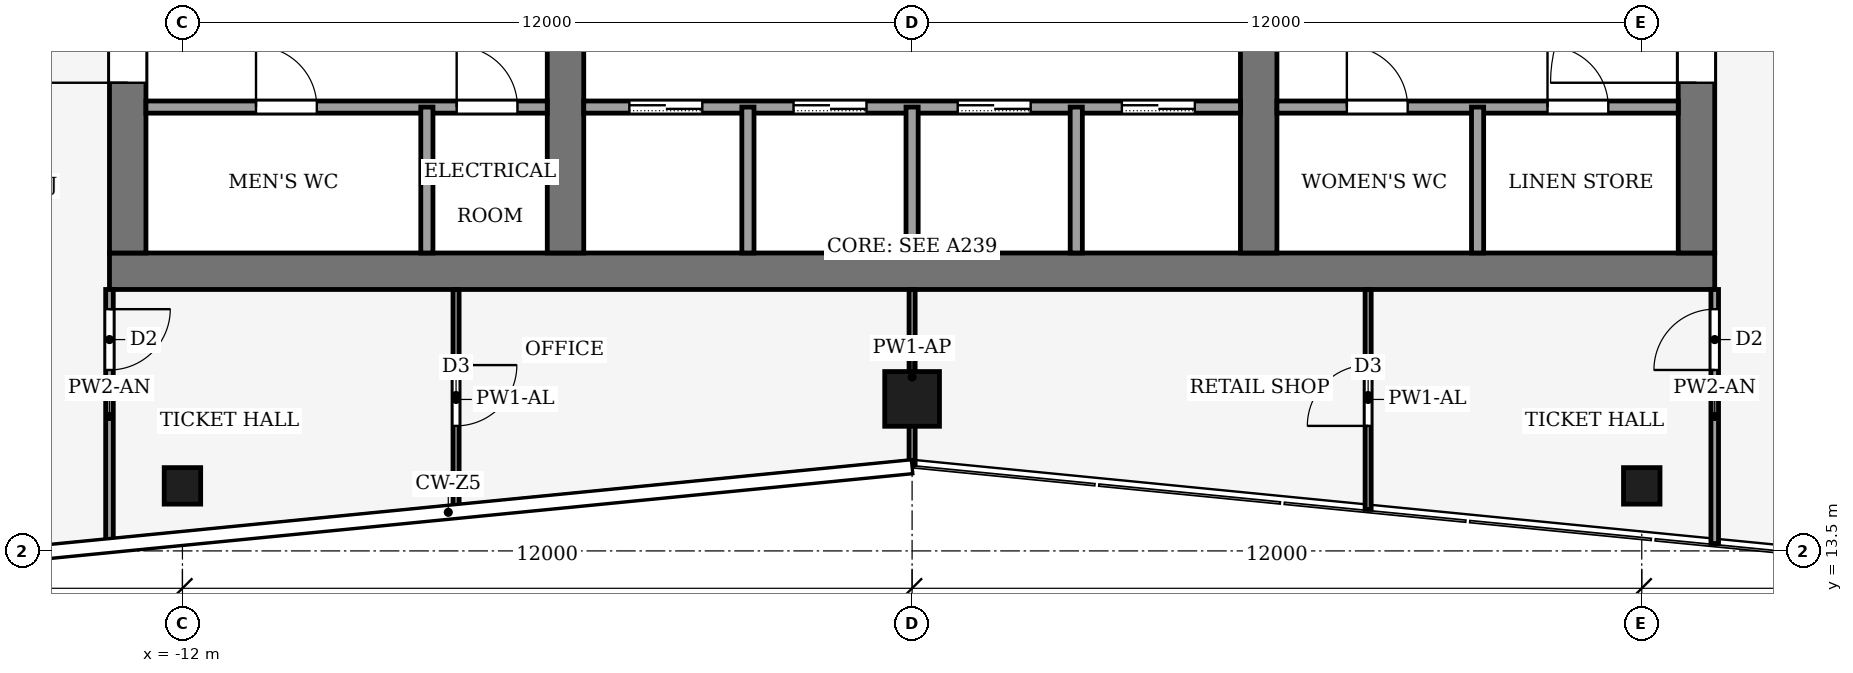
"""IFC4 building model, lengths in metres.
Left out: names, types, materials, properties, quantities, classifications, styles, units other than length and angle.
Written with IfcOpenShell. Run it as: python <this file> out.ifc"""

import sys

from ifc_helpers import new_model, si_unit, direction, frame, frame_2d, origin, origin_2d, place, context, subcontext, project, spatial, rectangle, hollow_rectangle, extrude, element, fill, save


model = new_model("IFC4")
c1 = context("Model", 3, precision=1e-05, world=origin(), true_north=direction((0.0, 1.0)))
c2 = subcontext(c1, "Body", "Model", "MODEL_VIEW")
j1 = project(units=[si_unit("LENGTHUNIT", "METRE"), si_unit("PLANEANGLEUNIT", "RADIAN")], contexts=[c1])
p1 = place(None, origin())
s1 = spatial("IfcSite", under=j1, at=p1, CompositionType="ELEMENT")
p2 = place(p1, origin())
s2 = spatial("IfcBuilding", under=s1, at=p2, CompositionType="ELEMENT")
p3 = place(p2, frame((0.0, 0.0, 334.0)))
s3 = spatial("IfcBuildingStorey", under=s2, at=p3, CompositionType="ELEMENT", Elevation=334.0)
p4 = place(p3, frame((-13.2, 18.1, -0.18), z_axis=(0.0, 0.0, 1.0), x_axis=(1.0, 0.0, 0.0)))
e1 = element("IfcWall", 1, at=p4, inside=s3, PredefinedType="SHEAR", context=c2, shape_type="SweptSolid", body=[
    extrude(rectangle(XDim=26.4, YDim=0.6, at=frame_2d((13.2, 0.0))), origin(), (0.0, 0.0, 1.0), 6.53),
])
p5 = place(p3, frame((-12.9, 18.4, -0.18), z_axis=(0.0, 0.0, 1.0), x_axis=(0.0, 1.0, 0.0)))
e2 = element("IfcWall", 2, at=p5, inside=s3, PredefinedType="SHEAR", context=c2, shape_type="SweptSolid", body=[
    extrude(rectangle(XDim=19.2, YDim=0.6, at=frame_2d((9.6, 0.0))), origin(), (0.0, 0.0, 1.0), 6.53),
])
p6 = place(p5, frame((2.8, 0.0, 0.18)))
e3 = element("IfcOpeningElement", 3, at=p6, cuts=e2, PredefinedType="OPENING", context=c2, shape_type="SweptSolid", body=[
    extrude(rectangle(XDim=2.4, YDim=2.4, at=frame_2d((1.2, 1.2))), frame((0.0, 0.31, 0.0), z_axis=(0.0, -1.0, 0.0), x_axis=(1.0, 0.0, 0.0)), (0.0, 0.0, 1.0), 0.62),
])
p7 = place(p5, frame((13.4, 0.0, 0.18)))
e4 = element("IfcOpeningElement", 4, at=p7, cuts=e2, PredefinedType="OPENING", context=c2, shape_type="SweptSolid", body=[
    extrude(rectangle(XDim=1.4, YDim=2.2, at=frame_2d((0.7, 1.1))), frame((0.0, 0.31, 0.0), z_axis=(0.0, -1.0, 0.0), x_axis=(1.0, 0.0, 0.0)), (0.0, 0.0, 1.0), 0.62),
])
p8 = place(p3, frame((12.9, 18.4, -0.18), z_axis=(0.0, 0.0, 1.0), x_axis=(0.0, 1.0, 0.0)))
e5 = element("IfcWall", 5, at=p8, inside=s3, PredefinedType="SHEAR", context=c2, shape_type="SweptSolid", body=[
    extrude(rectangle(XDim=19.2, YDim=0.6, at=frame_2d((9.6, 0.0))), origin(), (0.0, 0.0, 1.0), 6.53),
])
p9 = place(p8, frame((2.8, 0.0, 0.18)))
e6 = element("IfcOpeningElement", 6, at=p9, cuts=e5, PredefinedType="OPENING", context=c2, shape_type="SweptSolid", body=[
    extrude(rectangle(XDim=2.4, YDim=2.4, at=frame_2d((1.2, 1.2))), frame((0.0, 0.31, 0.0), z_axis=(0.0, -1.0, 0.0), x_axis=(1.0, 0.0, 0.0)), (0.0, 0.0, 1.0), 0.62),
])
p10 = place(p8, frame((13.3, 0.0, 0.18)))
e7 = element("IfcOpeningElement", 7, at=p10, cuts=e5, PredefinedType="OPENING", context=c2, shape_type="SweptSolid", body=[
    extrude(rectangle(XDim=2.4, YDim=2.4, at=frame_2d((1.2, 1.2))), frame((0.0, 0.31, 0.0), z_axis=(0.0, -1.0, 0.0), x_axis=(1.0, 0.0, 0.0)), (0.0, 0.0, 1.0), 0.62),
])
p11 = place(p3, frame((-5.7, 18.4, -0.18), z_axis=(0.0, 0.0, 1.0), x_axis=(0.0, 1.0, 0.0)))
e8 = element("IfcWall", 8, at=p11, inside=s3, PredefinedType="SHEAR", context=c2, shape_type="SweptSolid", body=[
    extrude(rectangle(XDim=19.2, YDim=0.6, at=frame_2d((9.6, 0.0))), origin(), (0.0, 0.0, 1.0), 6.53),
])
p12 = place(p11, frame((8.35, 0.0, 0.18)))
e9 = element("IfcOpeningElement", 9, at=p12, cuts=e8, PredefinedType="OPENING", context=c2, shape_type="SweptSolid", body=[
    extrude(rectangle(XDim=0.9, YDim=2.1, at=frame_2d((0.45, 1.05))), frame((0.0, 0.31, 0.0), z_axis=(0.0, -1.0, 0.0), x_axis=(1.0, 0.0, 0.0)), (0.0, 0.0, 1.0), 0.62),
])
p13 = place(p3, frame((5.7, 18.4, -0.18), z_axis=(0.0, 0.0, 1.0), x_axis=(0.0, 1.0, 0.0)))
e10 = element("IfcWall", 10, at=p13, inside=s3, PredefinedType="SHEAR", context=c2, shape_type="SweptSolid", body=[
    extrude(rectangle(XDim=19.2, YDim=0.6, at=frame_2d((9.6, 0.0))), origin(), (0.0, 0.0, 1.0), 6.53),
])
p14 = place(p13, frame((8.35, 0.0, 0.18)))
e11 = element("IfcOpeningElement", 11, at=p14, cuts=e10, PredefinedType="OPENING", context=c2, shape_type="SweptSolid", body=[
    extrude(rectangle(XDim=0.9, YDim=2.1, at=frame_2d((0.45, 1.05))), frame((0.0, 0.31, 0.0), z_axis=(0.0, -1.0, 0.0), x_axis=(1.0, 0.0, 0.0)), (0.0, 0.0, 1.0), 0.62),
])
p15 = place(p13, frame((13.3, 0.0, 0.18)))
e12 = element("IfcOpeningElement", 12, at=p15, cuts=e10, PredefinedType="OPENING", context=c2, shape_type="SweptSolid", body=[
    extrude(rectangle(XDim=2.4, YDim=2.4, at=frame_2d((1.2, 1.2))), frame((0.0, 0.31, 0.0), z_axis=(0.0, -1.0, 0.0), x_axis=(1.0, 0.0, 0.0)), (0.0, 0.0, 1.0), 0.62),
])
p16 = place(p3, frame((0.0, 16.0, 0.0), z_axis=(0.0, 0.0, 1.0), x_axis=(1.0, 0.0, 0.0)))
e13 = element("IfcColumn", 13, at=p16, inside=s3, PredefinedType="COLUMN", context=c2, shape_type="SweptSolid", body=[
    extrude(hollow_rectangle(XDim=0.9, YDim=0.9, WallThickness=0.04, at=origin_2d()), origin(), (0.0, 0.0, 1.0), 6.5),
])
for number, where, z_axis, x_axis in (
    (14, (-12.0, 14.57, 0.0), (0.0, 0.0, 1.0), (1.0, 0.0, 0.0)),
    (15, (12.0, 14.57, 0.0), (0.0, 0.0, 1.0), (1.0, 0.0, 0.0)),
):
    element("IfcColumn", number, at=place(p3, frame(where, z_axis=z_axis, x_axis=x_axis)), inside=s3, PredefinedType="COLUMN", context=c2, shape_type="SweptSolid", body=[
        extrude(hollow_rectangle(XDim=0.6, YDim=0.6, WallThickness=0.025, at=origin_2d()), origin(), (0.0, 0.0, 1.0), 6.5),
    ])
p17 = place(p3, frame((-12.6, 20.8, 0.0), z_axis=(0.0, 0.0, 1.0), x_axis=(1.0, 0.0, 0.0)))
e16 = element("IfcWall", 16, at=p17, inside=s3, PredefinedType="PARTITIONING", context=c2, shape_type="SweptSolid", body=[
    extrude(rectangle(XDim=6.6, YDim=0.2, at=frame_2d((3.3, 0.0))), origin(), (0.0, 0.0, 1.0), 6.35),
])
p18 = place(p17, frame((1.81, 0.0, 0.0)))
e17 = element("IfcOpeningElement", 17, at=p18, cuts=e16, PredefinedType="OPENING", context=c2, shape_type="SweptSolid", body=[
    extrude(rectangle(XDim=1.0, YDim=2.1, at=frame_2d((0.5, 1.05))), frame((0.0, 0.11, 0.0), z_axis=(0.0, -1.0, 0.0), x_axis=(1.0, 0.0, 0.0)), (0.0, 0.0, 1.0), 0.22),
])
p19 = place(p17, frame((5.11, 0.0, 0.0)))
e18 = element("IfcOpeningElement", 18, at=p19, cuts=e16, PredefinedType="OPENING", context=c2, shape_type="SweptSolid", body=[
    extrude(rectangle(XDim=1.0, YDim=2.1, at=frame_2d((0.5, 1.05))), frame((0.0, 0.11, 0.0), z_axis=(0.0, -1.0, 0.0), x_axis=(1.0, 0.0, 0.0)), (0.0, 0.0, 1.0), 0.22),
])
p20 = place(p3, frame((-5.4, 20.8, 0.0), z_axis=(0.0, 0.0, 1.0), x_axis=(1.0, 0.0, 0.0)))
e19 = element("IfcWall", 19, at=p20, inside=s3, PredefinedType="PARTITIONING", context=c2, shape_type="SweptSolid", body=[
    extrude(rectangle(XDim=10.8, YDim=0.2, at=frame_2d((5.4, 0.0))), origin(), (0.0, 0.0, 1.0), 6.35),
])
p21 = place(p20, frame((0.75, 0.0, 0.0)))
e20 = element("IfcOpeningElement", 20, at=p21, cuts=e19, PredefinedType="OPENING", context=c2, shape_type="SweptSolid", body=[
    extrude(rectangle(XDim=1.2, YDim=2.2, at=frame_2d((0.6, 1.1))), frame((0.0, 0.11, 0.0), z_axis=(0.0, -1.0, 0.0), x_axis=(1.0, 0.0, 0.0)), (0.0, 0.0, 1.0), 0.22),
])
p22 = place(p20, frame((3.45, 0.0, 0.0)))
e21 = element("IfcOpeningElement", 21, at=p22, cuts=e19, PredefinedType="OPENING", context=c2, shape_type="SweptSolid", body=[
    extrude(rectangle(XDim=1.2, YDim=2.2, at=frame_2d((0.6, 1.1))), frame((0.0, 0.11, 0.0), z_axis=(0.0, -1.0, 0.0), x_axis=(1.0, 0.0, 0.0)), (0.0, 0.0, 1.0), 0.22),
])
p23 = place(p20, frame((6.15, 0.0, 0.0)))
e22 = element("IfcOpeningElement", 22, at=p23, cuts=e19, PredefinedType="OPENING", context=c2, shape_type="SweptSolid", body=[
    extrude(rectangle(XDim=1.2, YDim=2.2, at=frame_2d((0.6, 1.1))), frame((0.0, 0.11, 0.0), z_axis=(0.0, -1.0, 0.0), x_axis=(1.0, 0.0, 0.0)), (0.0, 0.0, 1.0), 0.22),
])
p24 = place(p20, frame((8.85, 0.0, 0.0)))
e23 = element("IfcOpeningElement", 23, at=p24, cuts=e19, PredefinedType="OPENING", context=c2, shape_type="SweptSolid", body=[
    extrude(rectangle(XDim=1.2, YDim=2.2, at=frame_2d((0.6, 1.1))), frame((0.0, 0.11, 0.0), z_axis=(0.0, -1.0, 0.0), x_axis=(1.0, 0.0, 0.0)), (0.0, 0.0, 1.0), 0.22),
])
p25 = place(p3, frame((6.0, 20.8, 0.0), z_axis=(0.0, 0.0, 1.0), x_axis=(1.0, 0.0, 0.0)))
e24 = element("IfcWall", 24, at=p25, inside=s3, PredefinedType="PARTITIONING", context=c2, shape_type="SweptSolid", body=[
    extrude(rectangle(XDim=6.6, YDim=0.2, at=frame_2d((3.3, 0.0))), origin(), (0.0, 0.0, 1.0), 6.35),
])
p26 = place(p25, frame((1.15, 0.0, 0.0)))
e25 = element("IfcOpeningElement", 25, at=p26, cuts=e24, PredefinedType="OPENING", context=c2, shape_type="SweptSolid", body=[
    extrude(rectangle(XDim=1.0, YDim=2.1, at=frame_2d((0.5, 1.05))), frame((0.0, 0.11, 0.0), z_axis=(0.0, -1.0, 0.0), x_axis=(1.0, 0.0, 0.0)), (0.0, 0.0, 1.0), 0.22),
])
p27 = place(p25, frame((4.45, 0.0, 0.0)))
e26 = element("IfcOpeningElement", 26, at=p27, cuts=e24, PredefinedType="OPENING", context=c2, shape_type="SweptSolid", body=[
    extrude(rectangle(XDim=1.0, YDim=2.1, at=frame_2d((0.5, 1.05))), frame((0.0, 0.11, 0.0), z_axis=(0.0, -1.0, 0.0), x_axis=(1.0, 0.0, 0.0)), (0.0, 0.0, 1.0), 0.22),
])
for number, where, z_axis, x_axis in (
    (27, (-7.98, 18.4, 0.0), (0.0, 0.0, 1.0), (0.0, 1.0, 0.0)),
    (28, (-2.7, 18.4, 0.0), (0.0, 0.0, 1.0), (0.0, 1.0, 0.0)),
    (29, (0.0, 18.4, 0.0), (0.0, 0.0, 1.0), (0.0, 1.0, 0.0)),
    (30, (2.7, 18.4, 0.0), (0.0, 0.0, 1.0), (0.0, 1.0, 0.0)),
    (31, (9.3, 18.4, 0.0), (0.0, 0.0, 1.0), (0.0, 1.0, 0.0)),
):
    element("IfcWall", number, at=place(p3, frame(where, z_axis=z_axis, x_axis=x_axis)), inside=s3, PredefinedType="PARTITIONING", context=c2, shape_type="SweptSolid", body=[
        extrude(rectangle(XDim=2.4, YDim=0.2, at=frame_2d((1.2, 0.0))), origin(), (0.0, 0.0, 1.0), 6.35),
    ])
p28 = place(p3, frame((-13.2, 17.8, 0.0), z_axis=(0.0, 0.0, 1.0), x_axis=(0.0, -1.0, 0.0)))
e32 = element("IfcWall", 32, at=p28, inside=s3, PredefinedType="PARTITIONING", context=c2, shape_type="SweptSolid", body=[
    extrude(rectangle(XDim=4.178, YDim=0.125, at=frame_2d((2.089, 0.0))), origin(), (0.0, 0.0, 1.0), 5.52),
])
p29 = place(p28, frame((0.324, 0.0, 0.0)))
e33 = element("IfcOpeningElement", 33, at=p29, cuts=e32, PredefinedType="OPENING", context=c2, shape_type="SweptSolid", body=[
    extrude(rectangle(XDim=1.0, YDim=2.1, at=frame_2d((0.5, 1.05))), frame((0.0, 0.073, 0.0), z_axis=(0.0, -1.0, 0.0), x_axis=(1.0, 0.0, 0.0)), (0.0, 0.0, 1.0), 0.145),
])
p30 = place(p3, frame((13.2, 13.622, 0.0), z_axis=(0.0, 0.0, 1.0), x_axis=(0.0, 1.0, 0.0)))
e34 = element("IfcWall", 34, at=p30, inside=s3, PredefinedType="PARTITIONING", context=c2, shape_type="SweptSolid", body=[
    extrude(rectangle(XDim=4.178, YDim=0.125, at=frame_2d((2.089, 0.0))), origin(), (0.0, 0.0, 1.0), 5.52),
])
p31 = place(p30, frame((2.854, 0.0, 0.0)))
e35 = element("IfcOpeningElement", 35, at=p31, cuts=e34, PredefinedType="OPENING", context=c2, shape_type="SweptSolid", body=[
    extrude(rectangle(XDim=1.0, YDim=2.1, at=frame_2d((0.5, 1.05))), frame((0.0, 0.073, 0.0), z_axis=(0.0, -1.0, 0.0), x_axis=(1.0, 0.0, 0.0)), (0.0, 0.0, 1.0), 0.145),
])
p32 = place(p3, frame((-7.5, 17.8, 0.0), z_axis=(0.0, 0.0, 1.0), x_axis=(0.0, -1.0, 0.0)))
e36 = element("IfcWall", 36, at=p32, inside=s3, PredefinedType="PARTITIONING", context=c2, shape_type="SweptSolid", body=[
    extrude(rectangle(XDim=3.618, YDim=0.1, at=frame_2d((1.809, 0.0))), origin(), (0.0, 0.0, 1.0), 5.52),
])
p33 = place(p32, frame((1.244, 0.0, 0.0)))
e37 = element("IfcOpeningElement", 37, at=p33, cuts=e36, PredefinedType="OPENING", context=c2, shape_type="SweptSolid", body=[
    extrude(rectangle(XDim=1.0, YDim=2.1, at=frame_2d((0.5, 1.05))), frame((0.0, 0.06, 0.0), z_axis=(0.0, -1.0, 0.0), x_axis=(1.0, 0.0, 0.0)), (0.0, 0.0, 1.0), 0.12),
])
p34 = place(p3, frame((0.0, 14.92, 0.0), z_axis=(0.0, 0.0, 1.0), x_axis=(0.0, 1.0, 0.0)))
e38 = element("IfcWall", 38, at=p34, inside=s3, PredefinedType="PARTITIONING", context=c2, shape_type="SweptSolid", body=[
    extrude(rectangle(XDim=2.88, YDim=0.1, at=frame_2d((1.44, 0.0))), origin(), (0.0, 0.0, 1.0), 6.02),
])
p35 = place(p3, frame((7.5, 14.182, 0.0), z_axis=(0.0, 0.0, 1.0), x_axis=(0.0, 1.0, 0.0)))
e39 = element("IfcWall", 39, at=p35, inside=s3, PredefinedType="PARTITIONING", context=c2, shape_type="SweptSolid", body=[
    extrude(rectangle(XDim=3.618, YDim=0.1, at=frame_2d((1.809, 0.0))), origin(), (0.0, 0.0, 1.0), 5.52),
])
p36 = place(p35, frame((1.374, 0.0, 0.0)))
e40 = element("IfcOpeningElement", 40, at=p36, cuts=e39, PredefinedType="OPENING", context=c2, shape_type="SweptSolid", body=[
    extrude(rectangle(XDim=1.0, YDim=2.1, at=frame_2d((0.5, 1.05))), frame((0.0, 0.06, 0.0), z_axis=(0.0, -1.0, 0.0), x_axis=(1.0, 0.0, 0.0)), (0.0, 0.0, 1.0), 0.12),
])
p37 = place(p21, origin())
e41 = element("IfcDoor", 41, at=p37, inside=s3, OperationType="SLIDING_TO_LEFT", PredefinedType="DOOR", context=c2, shape_type="SweptSolid", body=[
    extrude(rectangle(XDim=1.2, YDim=2.2, at=frame_2d((0.6, 1.1))), frame((0.0, 0.025, 0.0), z_axis=(0.0, -1.0, 0.0), x_axis=(1.0, 0.0, 0.0)), (0.0, 0.0, 1.0), 0.05),
])
fill(e20, e41)
p38 = place(p22, origin())
e42 = element("IfcDoor", 42, at=p38, inside=s3, OperationType="SLIDING_TO_LEFT", PredefinedType="DOOR", context=c2, shape_type="SweptSolid", body=[
    extrude(rectangle(XDim=1.2, YDim=2.2, at=frame_2d((0.6, 1.1))), frame((0.0, 0.025, 0.0), z_axis=(0.0, -1.0, 0.0), x_axis=(1.0, 0.0, 0.0)), (0.0, 0.0, 1.0), 0.05),
])
fill(e21, e42)
p39 = place(p23, origin())
e43 = element("IfcDoor", 43, at=p39, inside=s3, OperationType="SLIDING_TO_LEFT", PredefinedType="DOOR", context=c2, shape_type="SweptSolid", body=[
    extrude(rectangle(XDim=1.2, YDim=2.2, at=frame_2d((0.6, 1.1))), frame((0.0, 0.025, 0.0), z_axis=(0.0, -1.0, 0.0), x_axis=(1.0, 0.0, 0.0)), (0.0, 0.0, 1.0), 0.05),
])
fill(e22, e43)
p40 = place(p24, origin())
e44 = element("IfcDoor", 44, at=p40, inside=s3, OperationType="SLIDING_TO_LEFT", PredefinedType="DOOR", context=c2, shape_type="SweptSolid", body=[
    extrude(rectangle(XDim=1.2, YDim=2.2, at=frame_2d((0.6, 1.1))), frame((0.0, 0.025, 0.0), z_axis=(0.0, -1.0, 0.0), x_axis=(1.0, 0.0, 0.0)), (0.0, 0.0, 1.0), 0.05),
])
fill(e23, e44)
p41 = place(p18, origin())
e45 = element("IfcDoor", 45, at=p41, inside=s3, OperationType="SINGLE_SWING_LEFT", PredefinedType="DOOR", context=c2, shape_type="SweptSolid", body=[
    extrude(rectangle(XDim=1.0, YDim=2.1, at=frame_2d((0.5, 1.05))), frame((0.0, 0.025, 0.0), z_axis=(0.0, -1.0, 0.0), x_axis=(1.0, 0.0, 0.0)), (0.0, 0.0, 1.0), 0.05),
])
fill(e17, e45)
p42 = place(p19, origin())
e46 = element("IfcDoor", 46, at=p42, inside=s3, OperationType="SINGLE_SWING_LEFT", PredefinedType="DOOR", context=c2, shape_type="SweptSolid", body=[
    extrude(rectangle(XDim=1.0, YDim=2.1, at=frame_2d((0.5, 1.05))), frame((0.0, 0.025, 0.0), z_axis=(0.0, -1.0, 0.0), x_axis=(1.0, 0.0, 0.0)), (0.0, 0.0, 1.0), 0.05),
])
fill(e18, e46)
p43 = place(p26, origin())
e47 = element("IfcDoor", 47, at=p43, inside=s3, OperationType="SINGLE_SWING_LEFT", PredefinedType="DOOR", context=c2, shape_type="SweptSolid", body=[
    extrude(rectangle(XDim=1.0, YDim=2.1, at=frame_2d((0.5, 1.05))), frame((0.0, 0.025, 0.0), z_axis=(0.0, -1.0, 0.0), x_axis=(1.0, 0.0, 0.0)), (0.0, 0.0, 1.0), 0.05),
])
fill(e25, e47)
p44 = place(p27, origin())
e48 = element("IfcDoor", 48, at=p44, inside=s3, OperationType="SINGLE_SWING_LEFT", PredefinedType="DOOR", context=c2, shape_type="SweptSolid", body=[
    extrude(rectangle(XDim=1.0, YDim=2.1, at=frame_2d((0.5, 1.05))), frame((0.0, 0.025, 0.0), z_axis=(0.0, -1.0, 0.0), x_axis=(1.0, 0.0, 0.0)), (0.0, 0.0, 1.0), 0.05),
])
fill(e26, e48)
p45 = place(p6, origin())
e49 = element("IfcDoor", 49, at=p45, inside=s3, OperationType="DOUBLE_DOOR_SINGLE_SWING", PredefinedType="DOOR", context=c2, shape_type="SweptSolid", body=[
    extrude(rectangle(XDim=2.4, YDim=2.4, at=frame_2d((1.2, 1.2))), frame((0.0, 0.025, 0.0), z_axis=(0.0, -1.0, 0.0), x_axis=(1.0, 0.0, 0.0)), (0.0, 0.0, 1.0), 0.05),
])
fill(e3, e49)
p46 = place(p9, origin())
e50 = element("IfcDoor", 50, at=p46, inside=s3, OperationType="DOUBLE_DOOR_SINGLE_SWING", PredefinedType="DOOR", context=c2, shape_type="SweptSolid", body=[
    extrude(rectangle(XDim=2.4, YDim=2.4, at=frame_2d((1.2, 1.2))), frame((0.0, 0.025, 0.0), z_axis=(0.0, -1.0, 0.0), x_axis=(1.0, 0.0, 0.0)), (0.0, 0.0, 1.0), 0.05),
])
fill(e6, e50)
p47 = place(p29, origin())
e51 = element("IfcDoor", 51, at=p47, inside=s3, OperationType="SINGLE_SWING_LEFT", PredefinedType="DOOR", context=c2, shape_type="SweptSolid", body=[
    extrude(rectangle(XDim=1.0, YDim=2.1, at=frame_2d((0.5, 1.05))), frame((0.0, 0.025, 0.0), z_axis=(0.0, -1.0, 0.0), x_axis=(1.0, 0.0, 0.0)), (0.0, 0.0, 1.0), 0.05),
])
fill(e33, e51)
p48 = place(p31, origin())
e52 = element("IfcDoor", 52, at=p48, inside=s3, OperationType="SINGLE_SWING_RIGHT", PredefinedType="DOOR", context=c2, shape_type="SweptSolid", body=[
    extrude(rectangle(XDim=1.0, YDim=2.1, at=frame_2d((0.5, 1.05))), frame((0.0, 0.025, 0.0), z_axis=(0.0, -1.0, 0.0), x_axis=(1.0, 0.0, 0.0)), (0.0, 0.0, 1.0), 0.05),
])
fill(e35, e52)
p49 = place(p33, origin())
e53 = element("IfcDoor", 53, at=p49, inside=s3, OperationType="SINGLE_SWING_LEFT", PredefinedType="DOOR", context=c2, shape_type="SweptSolid", body=[
    extrude(rectangle(XDim=1.0, YDim=2.1, at=frame_2d((0.5, 1.05))), frame((0.0, 0.025, 0.0), z_axis=(0.0, -1.0, 0.0), x_axis=(1.0, 0.0, 0.0)), (0.0, 0.0, 1.0), 0.05),
])
fill(e37, e53)
p50 = place(p36, origin())
e54 = element("IfcDoor", 54, at=p50, inside=s3, OperationType="SINGLE_SWING_RIGHT", PredefinedType="DOOR", context=c2, shape_type="SweptSolid", body=[
    extrude(rectangle(XDim=1.0, YDim=2.1, at=frame_2d((0.5, 1.05))), frame((0.0, 0.025, 0.0), z_axis=(0.0, -1.0, 0.0), x_axis=(1.0, 0.0, 0.0)), (0.0, 0.0, 1.0), 0.05),
])
fill(e40, e54)
save(model, sys.argv[1])
